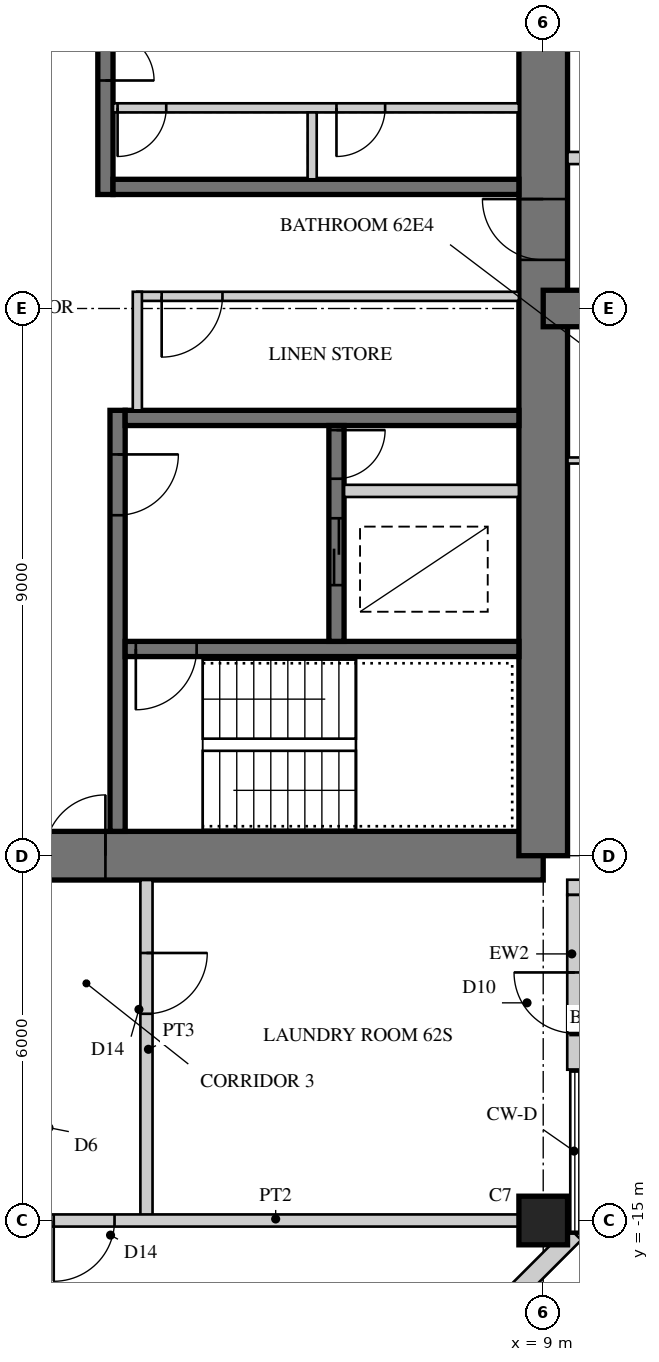
"""IFC4 building model, lengths in metres.
Left out: names, types, materials, properties, quantities, classifications, styles, units other than length and angle.
Written with IfcOpenShell. Run it as: python <this file> out.ifc"""

import sys

from ifc_helpers import new_model, si_unit, direction, frame, frame_2d, origin, origin_2d, place, context, subcontext, project, spatial, rectangle, hollow_rectangle, extrude, element, fill, save


model = new_model("IFC4")
c1 = context("Model", 3, precision=1e-05, world=origin(), true_north=direction((0.0, 1.0)))
c2 = subcontext(c1, "Body", "Model", "MODEL_VIEW")
j1 = project(units=[si_unit("LENGTHUNIT", "METRE"), si_unit("PLANEANGLEUNIT", "RADIAN")], contexts=[c1])
p1 = place(None, origin())
s1 = spatial("IfcSite", under=j1, at=p1, CompositionType="ELEMENT")
p2 = place(p1, origin())
s2 = spatial("IfcBuilding", under=s1, at=p2, CompositionType="ELEMENT")
p3 = place(p2, frame((0.0, 0.0, 242.5)))
s3 = spatial("IfcBuildingStorey", under=s2, at=p3, CompositionType="ELEMENT", Elevation=242.5)
p4 = place(p3, frame((-9.0, -9.0, 0.0), z_axis=(0.0, 0.0, 1.0), x_axis=(1.0, 0.0, 0.0)))
e1 = element("IfcWall", 1, at=p4, inside=s3, PredefinedType="SHEAR", context=c2, shape_type="SweptSolid", body=[
    extrude(rectangle(XDim=18.0, YDim=0.8, at=frame_2d((9.0, 0.0))), origin(), (0.0, 0.0, 1.0), 3.4),
])
p5 = place(p4, frame((9.8, 0.0, 0.0)))
e2 = element("IfcOpeningElement", 2, at=p5, cuts=e1, PredefinedType="OPENING", context=c2, shape_type="SweptSolid", body=[
    extrude(rectangle(XDim=1.0, YDim=2.4, at=frame_2d((0.5, 1.2))), frame((0.0, 0.41, 0.0), z_axis=(0.0, -1.0, 0.0), x_axis=(1.0, 0.0, 0.0)), (0.0, 0.0, 1.0), 0.82),
])
p6 = place(p3, frame((9.0, -9.0, 0.0), z_axis=(0.0, 0.0, 1.0), x_axis=(0.0, 1.0, 0.0)))
e3 = element("IfcWall", 3, at=p6, inside=s3, PredefinedType="SHEAR", context=c2, shape_type="SweptSolid", body=[
    extrude(rectangle(XDim=18.0, YDim=0.8, at=frame_2d((9.0, 0.0))), origin(), (0.0, 0.0, 1.0), 3.4),
])
p7 = place(p6, frame((9.8, 0.0, 0.0)))
e4 = element("IfcOpeningElement", 4, at=p7, cuts=e3, PredefinedType="OPENING", context=c2, shape_type="SweptSolid", body=[
    extrude(rectangle(XDim=1.0, YDim=2.4, at=frame_2d((0.5, 1.2))), frame((0.0, 0.41, 0.0), z_axis=(0.0, -1.0, 0.0), x_axis=(1.0, 0.0, 0.0)), (0.0, 0.0, 1.0), 0.82),
])
p8 = place(p3, frame((1.8, 1.875, 0.0), z_axis=(0.0, 0.0, 1.0), x_axis=(0.0, 1.0, 0.0)))
e5 = element("IfcWall", 5, at=p8, inside=s3, PredefinedType="SHEAR", context=c2, shape_type="SweptSolid", body=[
    extrude(rectangle(XDim=6.725, YDim=0.25, at=frame_2d((3.363, 0.0))), origin(), (0.0, 0.0, 1.0), 3.4),
])
p9 = place(p8, frame((1.875, 0.0, 0.0)))
e6 = element("IfcOpeningElement", 6, at=p9, cuts=e5, PredefinedType="OPENING", context=c2, shape_type="SweptSolid", body=[
    extrude(rectangle(XDim=1.6, YDim=2.4, at=frame_2d((0.8, 1.2))), frame((0.0, 0.135, 0.0), z_axis=(0.0, -1.0, 0.0), x_axis=(1.0, 0.0, 0.0)), (0.0, 0.0, 1.0), 0.27),
])
p10 = place(p3, frame((1.925, 2.0, 0.0), z_axis=(0.0, 0.0, 1.0), x_axis=(1.0, 0.0, 0.0)))
e7 = element("IfcWall", 7, at=p10, inside=s3, PredefinedType="SHEAR", context=c2, shape_type="SweptSolid", body=[
    extrude(rectangle(XDim=6.675, YDim=0.25, at=frame_2d((3.337, 0.0))), origin(), (0.0, 0.0, 1.0), 3.4),
])
p11 = place(p3, frame((1.925, 3.3, 0.0), z_axis=(0.0, 0.0, 1.0), x_axis=(1.0, 0.0, 0.0)))
e8 = element("IfcWall", 8, at=p11, inside=s3, PredefinedType="PARTITIONING", context=c2, shape_type="SweptSolid", body=[
    extrude(rectangle(XDim=6.675, YDim=0.15, at=frame_2d((3.337, 0.0))), origin(), (0.0, 0.0, 1.0), 3.4),
])
p12 = place(p11, frame((0.075, 0.0, 0.0)))
e9 = element("IfcOpeningElement", 9, at=p12, cuts=e8, PredefinedType="OPENING", context=c2, shape_type="SweptSolid", body=[
    extrude(rectangle(XDim=0.8, YDim=2.1, at=frame_2d((0.4, 1.05))), frame((0.0, 0.085, 0.0), z_axis=(0.0, -1.0, 0.0), x_axis=(1.0, 0.0, 0.0)), (0.0, 0.0, 1.0), 0.17),
])
p13 = place(p11, frame((3.675, 0.0, 0.0)))
e10 = element("IfcOpeningElement", 10, at=p13, cuts=e8, PredefinedType="OPENING", context=c2, shape_type="SweptSolid", body=[
    extrude(rectangle(XDim=0.8, YDim=2.1, at=frame_2d((0.4, 1.05))), frame((0.0, 0.085, 0.0), z_axis=(0.0, -1.0, 0.0), x_axis=(1.0, 0.0, 0.0)), (0.0, 0.0, 1.0), 0.17),
])
p14 = place(p3, frame((5.2, 2.125, 0.0), z_axis=(0.0, 0.0, 1.0), x_axis=(0.0, 1.0, 0.0)))
e11 = element("IfcWall", 11, at=p14, inside=s3, PredefinedType="PARTITIONING", context=c2, shape_type="SweptSolid", body=[
    extrude(rectangle(XDim=1.1, YDim=0.15, at=frame_2d((0.55, 0.0))), origin(), (0.0, 0.0, 1.0), 3.4),
])
p15 = place(p3, frame((2.0, -1.675, 0.0), z_axis=(0.0, 0.0, 1.0), x_axis=(0.0, -1.0, 0.0)))
e12 = element("IfcWall", 12, at=p15, inside=s3, PredefinedType="SHEAR", context=c2, shape_type="SweptSolid", body=[
    extrude(rectangle(XDim=6.925, YDim=0.25, at=frame_2d((3.462, 0.0))), origin(), (0.0, 0.0, 1.0), 3.4),
])
p16 = place(p15, frame((0.725, 0.0, 0.0)))
e13 = element("IfcOpeningElement", 13, at=p16, cuts=e12, PredefinedType="OPENING", context=c2, shape_type="SweptSolid", body=[
    extrude(rectangle(XDim=1.0, YDim=2.1, at=frame_2d((0.5, 1.05))), frame((0.0, 0.135, 0.0), z_axis=(0.0, -1.0, 0.0), x_axis=(1.0, 0.0, 0.0)), (0.0, 0.0, 1.0), 0.27),
])
p17 = place(p3, frame((2.125, -1.8, 0.0), z_axis=(0.0, 0.0, 1.0), x_axis=(1.0, 0.0, 0.0)))
e14 = element("IfcWall", 14, at=p17, inside=s3, PredefinedType="SHEAR", context=c2, shape_type="SweptSolid", body=[
    extrude(rectangle(XDim=6.475, YDim=0.25, at=frame_2d((3.238, 0.0))), origin(), (0.0, 0.0, 1.0), 3.4),
])
p18 = place(p3, frame((2.125, -5.6, 0.0), z_axis=(0.0, 0.0, 1.0), x_axis=(1.0, 0.0, 0.0)))
e15 = element("IfcWall", 15, at=p18, inside=s3, PredefinedType="SHEAR", context=c2, shape_type="SweptSolid", body=[
    extrude(rectangle(XDim=6.475, YDim=0.25, at=frame_2d((3.238, 0.0))), origin(), (0.0, 0.0, 1.0), 3.4),
])
p19 = place(p18, frame((0.175, 0.0, 0.0)))
e16 = element("IfcOpeningElement", 16, at=p19, cuts=e15, PredefinedType="OPENING", context=c2, shape_type="SweptSolid", body=[
    extrude(rectangle(XDim=1.0, YDim=2.1, at=frame_2d((0.5, 1.05))), frame((0.0, 0.135, 0.0), z_axis=(0.0, -1.0, 0.0), x_axis=(1.0, 0.0, 0.0)), (0.0, 0.0, 1.0), 0.27),
])
p20 = place(p3, frame((5.6, -1.925, 0.0), z_axis=(0.0, 0.0, 1.0), x_axis=(0.0, -1.0, 0.0)))
e17 = element("IfcWall", 17, at=p20, inside=s3, PredefinedType="SHEAR", context=c2, shape_type="SweptSolid", body=[
    extrude(rectangle(XDim=3.55, YDim=0.25, at=frame_2d((1.775, 0.0))), origin(), (0.0, 0.0, 1.0), 3.4),
])
p21 = place(p20, frame((1.525, 0.0, 0.0)))
e18 = element("IfcOpeningElement", 18, at=p21, cuts=e17, PredefinedType="OPENING", context=c2, shape_type="SweptSolid", body=[
    extrude(rectangle(XDim=1.1, YDim=2.2, at=frame_2d((0.55, 1.1))), frame((0.0, 0.135, 0.0), z_axis=(0.0, -1.0, 0.0), x_axis=(1.0, 0.0, 0.0)), (0.0, 0.0, 1.0), 0.27),
])
p22 = place(p20, frame((0.075, 0.0, 0.0)))
e19 = element("IfcOpeningElement", 19, at=p22, cuts=e17, PredefinedType="OPENING", context=c2, shape_type="SweptSolid", body=[
    extrude(rectangle(XDim=0.8, YDim=2.1, at=frame_2d((0.4, 1.05))), frame((0.0, 0.135, 0.0), z_axis=(0.0, -1.0, 0.0), x_axis=(1.0, 0.0, 0.0)), (0.0, 0.0, 1.0), 0.27),
])
p23 = place(p3, frame((5.725, -3.0, 0.0), z_axis=(0.0, 0.0, 1.0), x_axis=(1.0, 0.0, 0.0)))
e20 = element("IfcWall", 20, at=p23, inside=s3, PredefinedType="PARTITIONING", context=c2, shape_type="SweptSolid", body=[
    extrude(rectangle(XDim=2.875, YDim=0.2, at=frame_2d((1.438, 0.0))), origin(), (0.0, 0.0, 1.0), 3.4),
])
p24 = place(p3, frame((9.0, 0.0, 0.0), z_axis=(0.0, 0.0, 1.0), x_axis=(1.0, 0.0, 0.0)))
e21 = element("IfcWall", 21, at=p24, inside=s3, PredefinedType="SHEAR", context=c2, shape_type="SweptSolid", body=[
    extrude(rectangle(XDim=9.0, YDim=0.6, at=frame_2d((4.5, 0.0))), origin(), (0.0, 0.0, 1.0), 3.4),
])
p25 = place(p24, frame((3.8, 0.0, 0.0)))
e22 = element("IfcOpeningElement", 22, at=p25, cuts=e21, PredefinedType="OPENING", context=c2, shape_type="SweptSolid", body=[
    extrude(rectangle(XDim=1.0, YDim=2.15, at=frame_2d((0.5, 1.075))), frame((0.0, 0.31, 0.0), z_axis=(0.0, -1.0, 0.0), x_axis=(1.0, 0.0, 0.0)), (0.0, 0.0, 1.0), 0.62),
])
p26 = place(p24, frame((7.0, 0.0, 0.0)))
e23 = element("IfcOpeningElement", 23, at=p26, cuts=e21, PredefinedType="OPENING", context=c2, shape_type="SweptSolid", body=[
    extrude(rectangle(XDim=1.0, YDim=2.2, at=frame_2d((0.5, 1.1))), frame((0.0, 0.31, 0.0), z_axis=(0.0, -1.0, 0.0), x_axis=(1.0, 0.0, 0.0)), (0.0, 0.0, 1.0), 0.62),
])
p27 = place(p3, frame((9.0, -15.0, 0.0), z_axis=(0.0, 0.0, 1.0), x_axis=(1.0, 0.0, 0.0)))
e24 = element("IfcColumn", 24, at=p27, inside=s3, PredefinedType="COLUMN", context=c2, shape_type="SweptSolid", body=[
    extrude(rectangle(XDim=0.8, YDim=0.8, at=origin_2d()), origin(), (0.0, 0.0, 1.0), 3.4),
])
p28 = place(p3, frame((9.395, -9.52, 0.0), z_axis=(0.0, 0.0, 1.0), x_axis=(1.0, 0.0, 0.0)))
e25 = element("IfcWall", 25, at=p28, inside=s3, PredefinedType="SOLIDWALL", context=c2, shape_type="SweptSolid", body=[
    extrude(rectangle(XDim=3.125, YDim=0.25, at=frame_2d((1.562, 0.0))), origin(), (0.0, 0.0, 1.0), 3.22),
])
p29 = place(p28, frame((0.6, 0.0, 0.0)))
e26 = element("IfcOpeningElement", 26, at=p29, cuts=e25, PredefinedType="OPENING", context=c2, shape_type="SweptSolid", body=[
    extrude(rectangle(XDim=1.0, YDim=2.2, at=frame_2d((0.5, 1.1))), frame((0.0, 0.135, 0.0), z_axis=(0.0, -1.0, 0.0), x_axis=(1.0, 0.0, 0.0)), (0.0, 0.0, 1.0), 0.27),
])
p30 = place(p3, frame((6.215, -18.52, 0.0), z_axis=(0.0, 0.0, 1.0), x_axis=(0.707106781187, 0.707106781187, 0.0)))
e27 = element("IfcWall", 27, at=p30, inside=s3, PredefinedType="SOLIDWALL", context=c2, shape_type="SweptSolid", body=[
    extrude(rectangle(XDim=4.674, YDim=0.3, at=frame_2d((2.337, 0.0))), origin(), (0.0, 0.0, 1.0), 3.22),
])
p31 = place(p30, frame((1.887, 0.0, 0.3)))
e28 = element("IfcOpeningElement", 28, at=p31, cuts=e27, PredefinedType="OPENING", context=c2, shape_type="SweptSolid", body=[
    extrude(rectangle(XDim=0.9, YDim=2.4, at=frame_2d((0.45, 1.2))), frame((0.0, 0.16, 0.0), z_axis=(0.0, -1.0, 0.0), x_axis=(1.0, 0.0, 0.0)), (0.0, 0.0, 1.0), 0.32),
])
p32 = place(p3, frame((9.52, -12.52, 0.0), z_axis=(0.0, 0.0, 1.0), x_axis=(0.0, 1.0, 0.0)))
e29 = element("IfcWall", 29, at=p32, inside=s3, PredefinedType="SOLIDWALL", context=c2, shape_type="SweptSolid", body=[
    extrude(rectangle(XDim=2.875, YDim=0.25, at=frame_2d((1.438, 0.0))), origin(), (0.0, 0.0, 1.0), 3.22),
])
p33 = place(p32, frame((0.6, 0.0, 0.0)))
e30 = element("IfcOpeningElement", 30, at=p33, cuts=e29, PredefinedType="OPENING", context=c2, shape_type="SweptSolid", body=[
    extrude(rectangle(XDim=1.0, YDim=2.2, at=frame_2d((0.5, 1.1))), frame((0.0, 0.135, 0.0), z_axis=(0.0, -1.0, 0.0), x_axis=(1.0, 0.0, 0.0)), (0.0, 0.0, 1.0), 0.27),
])
p34 = place(p3, frame((2.325, 0.2, 0.0), z_axis=(0.0, 0.0, 1.0), x_axis=(1.0, 0.0, 0.0)))
e31 = element("IfcWall", 31, at=p34, inside=s3, PredefinedType="PARTITIONING", context=c2, shape_type="SweptSolid", body=[
    extrude(rectangle(XDim=6.275, YDim=0.15, at=frame_2d((3.138, 0.0))), origin(), (0.0, 0.0, 1.0), 3.22),
])
p35 = place(p34, frame((0.4, 0.0, 0.0)))
e32 = element("IfcOpeningElement", 32, at=p35, cuts=e31, PredefinedType="OPENING", context=c2, shape_type="SweptSolid", body=[
    extrude(rectangle(XDim=1.0, YDim=2.1, at=frame_2d((0.5, 1.05))), frame((0.0, 0.085, 0.0), z_axis=(0.0, -1.0, 0.0), x_axis=(1.0, 0.0, 0.0)), (0.0, 0.0, 1.0), 0.17),
])
p36 = place(p3, frame((2.325, -1.675, 0.0), z_axis=(0.0, 0.0, 1.0), x_axis=(0.0, 1.0, 0.0)))
e33 = element("IfcWall", 33, at=p36, inside=s3, PredefinedType="PARTITIONING", context=c2, shape_type="SweptSolid", body=[
    extrude(rectangle(XDim=1.95, YDim=0.15, at=frame_2d((0.975, 0.0))), origin(), (0.0, 0.0, 1.0), 3.22),
])
p37 = place(p3, frame((9.4, -2.5, 0.0), z_axis=(0.0, 0.0, 1.0), x_axis=(1.0, 0.0, 0.0)))
e34 = element("IfcWall", 34, at=p37, inside=s3, PredefinedType="PARTITIONING", context=c2, shape_type="SweptSolid", body=[
    extrude(rectangle(XDim=2.65, YDim=0.1, at=frame_2d((1.325, 0.0))), origin(), (0.0, 0.0, 1.0), 3.22),
])
p38 = place(p3, frame((9.4, 2.475, 0.0), z_axis=(0.0, 0.0, 1.0), x_axis=(1.0, 0.0, 0.0)))
e35 = element("IfcWall", 35, at=p38, inside=s3, PredefinedType="SOLIDWALL", context=c2, shape_type="SweptSolid", body=[
    extrude(rectangle(XDim=5.6, YDim=0.2, at=frame_2d((2.8, 0.0))), origin(), (0.0, 0.0, 1.0), 3.22),
])
p39 = place(p38, frame((3.75, 0.0, 0.0)))
e36 = element("IfcOpeningElement", 36, at=p39, cuts=e35, PredefinedType="OPENING", context=c2, shape_type="SweptSolid", body=[
    extrude(rectangle(XDim=1.0, YDim=2.15, at=frame_2d((0.5, 1.075))), frame((0.0, 0.11, 0.0), z_axis=(0.0, -1.0, 0.0), x_axis=(1.0, 0.0, 0.0)), (0.0, 0.0, 1.0), 0.22),
])
p40 = place(p3, frame((2.475, -9.4, 0.0), z_axis=(0.0, 0.0, 1.0), x_axis=(0.0, -1.0, 0.0)))
e37 = element("IfcWall", 37, at=p40, inside=s3, PredefinedType="SOLIDWALL", context=c2, shape_type="SweptSolid", body=[
    extrude(rectangle(XDim=5.6, YDim=0.2, at=frame_2d((2.8, 0.0))), origin(), (0.0, 0.0, 1.0), 3.22),
])
p41 = place(p40, frame((1.2, 0.0, 0.0)))
e38 = element("IfcOpeningElement", 38, at=p41, cuts=e37, PredefinedType="OPENING", context=c2, shape_type="SweptSolid", body=[
    extrude(rectangle(XDim=1.0, YDim=2.2, at=frame_2d((0.5, 1.1))), frame((0.0, 0.11, 0.0), z_axis=(0.0, -1.0, 0.0), x_axis=(1.0, 0.0, 0.0)), (0.0, 0.0, 1.0), 0.22),
])
p42 = place(p3, frame((0.6, -15.0, 0.0), z_axis=(0.0, 0.0, 1.0), x_axis=(1.0, 0.0, 0.0)))
e39 = element("IfcWall", 39, at=p42, inside=s3, PredefinedType="SOLIDWALL", context=c2, shape_type="SweptSolid", body=[
    extrude(rectangle(XDim=8.0, YDim=0.2, at=frame_2d((4.0, 0.0))), origin(), (0.0, 0.0, 1.0), 2.52),
])
p43 = place(p42, frame((0.35, 0.0, 0.0)))
e40 = element("IfcOpeningElement", 40, at=p43, cuts=e39, PredefinedType="OPENING", context=c2, shape_type="SweptSolid", body=[
    extrude(rectangle(XDim=1.0, YDim=2.2, at=frame_2d((0.5, 1.1))), frame((0.0, 0.11, 0.0), z_axis=(0.0, -1.0, 0.0), x_axis=(1.0, 0.0, 0.0)), (0.0, 0.0, 1.0), 0.22),
])
p44 = place(p33, origin())
e41 = element("IfcDoor", 41, at=p44, inside=s3, OperationType="SINGLE_SWING_RIGHT", PredefinedType="DOOR", context=c2, shape_type="SweptSolid", body=[
    extrude(hollow_rectangle(XDim=1.0, YDim=2.2, WallThickness=0.06, at=frame_2d((0.5, 1.1))), frame((0.0, 0.025, 0.0), z_axis=(0.0, -1.0, 0.0), x_axis=(1.0, 0.0, 0.0)), (0.0, 0.0, 1.0), 0.05),
    extrude(rectangle(XDim=0.879, YDim=2.079, at=frame_2d((0.5, 1.1))), frame((0.0, 0.025, 0.0), z_axis=(0.0, -1.0, 0.0), x_axis=(1.0, 0.0, 0.0)), (0.0, 0.0, 1.0), 0.05),
])
fill(e30, e41)
p45 = place(p35, frame((1.0, 0.0, 0.0), z_axis=(0.0, 0.0, 1.0), x_axis=(-1.0, 0.0, 0.0)))
e42 = element("IfcDoor", 42, at=p45, inside=s3, OperationType="SINGLE_SWING_RIGHT", PredefinedType="DOOR", context=c2, shape_type="SweptSolid", body=[
    extrude(rectangle(XDim=1.0, YDim=2.1, at=frame_2d((0.5, 1.05))), frame((0.0, 0.025, 0.0), z_axis=(0.0, -1.0, 0.0), x_axis=(1.0, 0.0, 0.0)), (0.0, 0.0, 1.0), 0.05),
])
fill(e32, e42)
p46 = place(p41, origin())
e43 = element("IfcDoor", 43, at=p46, inside=s3, OperationType="SINGLE_SWING_LEFT", PredefinedType="DOOR", context=c2, shape_type="SweptSolid", body=[
    extrude(rectangle(XDim=1.0, YDim=2.2, at=frame_2d((0.5, 1.1))), frame((0.0, 0.025, 0.0), z_axis=(0.0, -1.0, 0.0), x_axis=(1.0, 0.0, 0.0)), (0.0, 0.0, 1.0), 0.05),
])
fill(e38, e43)
p47 = place(p43, frame((1.0, 0.0, 0.0), z_axis=(0.0, 0.0, 1.0), x_axis=(-1.0, 0.0, 0.0)))
e44 = element("IfcDoor", 44, at=p47, inside=s3, OperationType="SINGLE_SWING_RIGHT", PredefinedType="DOOR", context=c2, shape_type="SweptSolid", body=[
    extrude(rectangle(XDim=1.0, YDim=2.2, at=frame_2d((0.5, 1.1))), frame((0.0, 0.025, 0.0), z_axis=(0.0, -1.0, 0.0), x_axis=(1.0, 0.0, 0.0)), (0.0, 0.0, 1.0), 0.05),
])
fill(e40, e44)
p48 = place(p5, origin())
e45 = element("IfcDoor", 45, at=p48, inside=s3, OperationType="SINGLE_SWING_RIGHT", PredefinedType="DOOR", context=c2, shape_type="SweptSolid", body=[
    extrude(rectangle(XDim=1.0, YDim=2.4, at=frame_2d((0.5, 1.2))), frame((0.0, 0.055, 0.0), z_axis=(0.0, -1.0, 0.0), x_axis=(1.0, 0.0, 0.0)), (0.0, 0.0, 1.0), 0.05),
])
fill(e2, e45)
p49 = place(p7, origin())
e46 = element("IfcDoor", 46, at=p49, inside=s3, OperationType="SINGLE_SWING_RIGHT", PredefinedType="DOOR", context=c2, shape_type="SweptSolid", body=[
    extrude(rectangle(XDim=1.0, YDim=2.4, at=frame_2d((0.5, 1.2))), frame((0.0, 0.055, 0.0), z_axis=(0.0, -1.0, 0.0), x_axis=(1.0, 0.0, 0.0)), (0.0, 0.0, 1.0), 0.05),
])
fill(e4, e46)
p50 = place(p9, frame((1.6, 0.0, 0.0), z_axis=(0.0, 0.0, 1.0), x_axis=(-1.0, 0.0, 0.0)))
e47 = element("IfcDoor", 47, at=p50, inside=s3, OperationType="DOUBLE_DOOR_SINGLE_SWING", PredefinedType="DOOR", context=c2, shape_type="SweptSolid", body=[
    extrude(rectangle(XDim=1.6, YDim=2.4, at=frame_2d((0.8, 1.2))), frame((0.0, 0.025, 0.0), z_axis=(0.0, -1.0, 0.0), x_axis=(1.0, 0.0, 0.0)), (0.0, 0.0, 1.0), 0.05),
])
fill(e6, e47)
p51 = place(p12, frame((0.8, 0.0, 0.0), z_axis=(0.0, 0.0, 1.0), x_axis=(-1.0, 0.0, 0.0)))
e48 = element("IfcDoor", 48, at=p51, inside=s3, OperationType="SINGLE_SWING_RIGHT", PredefinedType="DOOR", context=c2, shape_type="SweptSolid", body=[
    extrude(rectangle(XDim=0.8, YDim=2.1, at=frame_2d((0.4, 1.05))), frame((0.0, 0.025, 0.0), z_axis=(0.0, -1.0, 0.0), x_axis=(1.0, 0.0, 0.0)), (0.0, 0.0, 1.0), 0.05),
])
fill(e9, e48)
p52 = place(p13, frame((0.8, 0.0, 0.0), z_axis=(0.0, 0.0, 1.0), x_axis=(-1.0, 0.0, 0.0)))
e49 = element("IfcDoor", 49, at=p52, inside=s3, OperationType="SINGLE_SWING_RIGHT", PredefinedType="DOOR", context=c2, shape_type="SweptSolid", body=[
    extrude(rectangle(XDim=0.8, YDim=2.1, at=frame_2d((0.4, 1.05))), frame((0.0, 0.025, 0.0), z_axis=(0.0, -1.0, 0.0), x_axis=(1.0, 0.0, 0.0)), (0.0, 0.0, 1.0), 0.05),
])
fill(e10, e49)
p53 = place(p16, origin())
e50 = element("IfcDoor", 50, at=p53, inside=s3, OperationType="SINGLE_SWING_LEFT", PredefinedType="DOOR", context=c2, shape_type="SweptSolid", body=[
    extrude(rectangle(XDim=1.0, YDim=2.1, at=frame_2d((0.5, 1.05))), frame((0.0, 0.025, 0.0), z_axis=(0.0, -1.0, 0.0), x_axis=(1.0, 0.0, 0.0)), (0.0, 0.0, 1.0), 0.05),
])
fill(e13, e50)
p54 = place(p19, frame((1.0, 0.0, 0.0), z_axis=(0.0, 0.0, 1.0), x_axis=(-1.0, 0.0, 0.0)))
e51 = element("IfcDoor", 51, at=p54, inside=s3, OperationType="SINGLE_SWING_RIGHT", PredefinedType="DOOR", context=c2, shape_type="SweptSolid", body=[
    extrude(rectangle(XDim=1.0, YDim=2.1, at=frame_2d((0.5, 1.05))), frame((0.0, 0.025, 0.0), z_axis=(0.0, -1.0, 0.0), x_axis=(1.0, 0.0, 0.0)), (0.0, 0.0, 1.0), 0.05),
])
fill(e16, e51)
p55 = place(p21, origin())
e52 = element("IfcDoor", 52, at=p55, inside=s3, OperationType="DOUBLE_DOOR_SLIDING", PredefinedType="DOOR", context=c2, shape_type="SweptSolid", body=[
    extrude(rectangle(XDim=1.1, YDim=2.2, at=frame_2d((0.55, 1.1))), frame((0.0, 0.025, 0.0), z_axis=(0.0, -1.0, 0.0), x_axis=(1.0, 0.0, 0.0)), (0.0, 0.0, 1.0), 0.05),
])
fill(e18, e52)
p56 = place(p22, origin())
e53 = element("IfcDoor", 53, at=p56, inside=s3, OperationType="SINGLE_SWING_LEFT", PredefinedType="DOOR", context=c2, shape_type="SweptSolid", body=[
    extrude(rectangle(XDim=0.8, YDim=2.1, at=frame_2d((0.4, 1.05))), frame((0.0, 0.025, 0.0), z_axis=(0.0, -1.0, 0.0), x_axis=(1.0, 0.0, 0.0)), (0.0, 0.0, 1.0), 0.05),
])
fill(e19, e53)
save(model, sys.argv[1])
